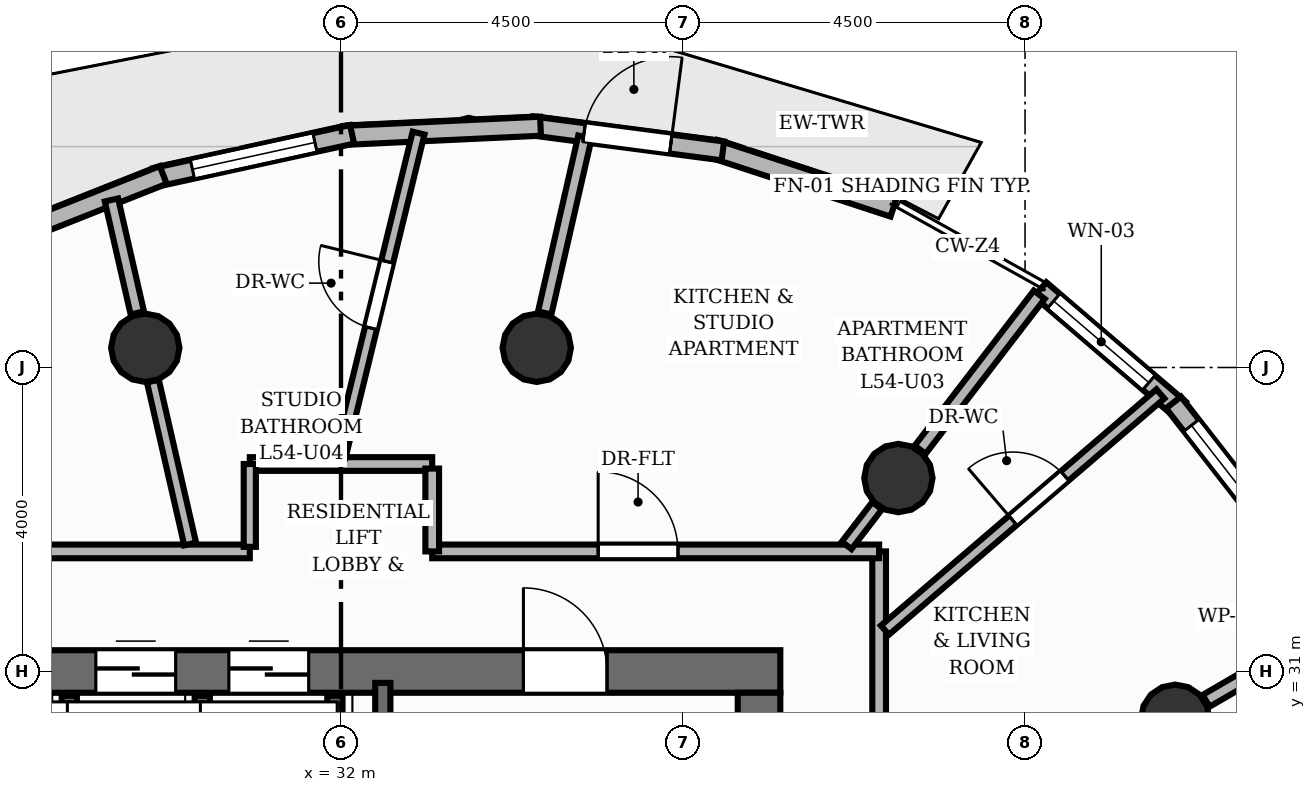
"""IFC4 building model, lengths in metres.
Left out: names, types, materials, properties, quantities, classifications, styles, units other than length and angle.
Written with IfcOpenShell. Run it as: python <this file> out.ifc"""

import sys

from ifc_helpers import new_model, si_unit, direction, frame, frame_2d, origin, origin_2d, place, context, subcontext, project, spatial, rectangle, circle, extrude, element, fill, save


model = new_model("IFC4")
c1 = context("Model", 3, precision=1e-05, world=origin(), true_north=direction((0.0, 1.0)))
c2 = subcontext(c1, "Body", "Model", "MODEL_VIEW")
j1 = project(units=[si_unit("LENGTHUNIT", "METRE"), si_unit("PLANEANGLEUNIT", "RADIAN")], contexts=[c1])
p1 = place(None, origin())
s1 = spatial("IfcSite", under=j1, at=p1, CompositionType="ELEMENT")
p2 = place(p1, origin())
s2 = spatial("IfcBuilding", under=s1, at=p2, CompositionType="ELEMENT")
p3 = place(p2, frame((0.0, 0.0, 182.24)))
s3 = spatial("IfcBuildingStorey", under=s2, at=p3, CompositionType="ELEMENT", Elevation=182.24)
p4 = place(p3, frame((26.22, 31.0, 0.0), z_axis=(0.0, 0.0, 1.0), x_axis=(1.0, 0.0, 0.0)))
e1 = element("IfcWall", 1, at=p4, inside=s3, PredefinedType="SHEAR", context=c2, shape_type="SweptSolid", body=[
    extrude(rectangle(XDim=11.56, YDim=0.56, at=frame_2d((5.78, 0.0))), origin(), (0.0, 0.0, 1.0), 3.2),
])
p5 = place(p4, frame((8.18, 0.0, 0.0)))
e2 = element("IfcOpeningElement", 2, at=p5, cuts=e1, PredefinedType="OPENING", context=c2, shape_type="SweptSolid", body=[
    extrude(rectangle(XDim=1.1, YDim=2.15, at=frame_2d((0.55, 1.075))), frame((0.0, 0.29, 0.0), z_axis=(0.0, -1.0, 0.0), x_axis=(1.0, 0.0, 0.0)), (0.0, 0.0, 1.0), 0.58),
])
p6 = place(p4, frame((0.805, 0.0, 0.0)))
e3 = element("IfcOpeningElement", 3, at=p6, cuts=e1, PredefinedType="OPENING", context=c2, shape_type="SweptSolid", body=[
    extrude(rectangle(XDim=1.05, YDim=2.15, at=frame_2d((0.525, 1.075))), frame((0.0, 0.29, 0.0), z_axis=(0.0, -1.0, 0.0), x_axis=(1.0, 0.0, 0.0)), (0.0, 0.0, 1.0), 0.58),
])
p7 = place(p4, frame((2.555, 0.0, 0.0)))
e4 = element("IfcOpeningElement", 4, at=p7, cuts=e1, PredefinedType="OPENING", context=c2, shape_type="SweptSolid", body=[
    extrude(rectangle(XDim=1.05, YDim=2.15, at=frame_2d((0.525, 1.075))), frame((0.0, 0.29, 0.0), z_axis=(0.0, -1.0, 0.0), x_axis=(1.0, 0.0, 0.0)), (0.0, 0.0, 1.0), 0.58),
])
p8 = place(p4, frame((4.305, 0.0, 0.0)))
e5 = element("IfcOpeningElement", 5, at=p8, cuts=e1, PredefinedType="OPENING", context=c2, shape_type="SweptSolid", body=[
    extrude(rectangle(XDim=1.05, YDim=2.15, at=frame_2d((0.525, 1.075))), frame((0.0, 0.29, 0.0), z_axis=(0.0, -1.0, 0.0), x_axis=(1.0, 0.0, 0.0)), (0.0, 0.0, 1.0), 0.58),
])
p9 = place(p3, frame((37.5, 17.28, 0.0), z_axis=(0.0, 0.0, 1.0), x_axis=(0.0, 1.0, 0.0)))
e6 = element("IfcWall", 6, at=p9, inside=s3, PredefinedType="SHEAR", context=c2, shape_type="SweptSolid", body=[
    extrude(rectangle(XDim=13.44, YDim=0.56, at=frame_2d((6.72, 0.0))), origin(), (0.0, 0.0, 1.0), 3.2),
])
for number, where, z_axis, x_axis in (
    (7, (42.975, 30.378, 0.0), (0.0, 0.0, 1.0), (1.0, 0.0, 0.0)),
    (8, (39.333, 33.545, 0.0), (0.0, 0.0, 1.0), (1.0, 0.0, 0.0)),
    (9, (34.575, 35.26, 0.0), (0.0, 0.0, 1.0), (1.0, 0.0, 0.0)),
    (10, (29.425, 35.26, 0.0), (0.0, 0.0, 1.0), (1.0, 0.0, 0.0)),
):
    element("IfcColumn", number, at=place(p3, frame(where, z_axis=z_axis, x_axis=x_axis)), inside=s3, PredefinedType="COLUMN", context=c2, shape_type="SweptSolid", body=[
        extrude(circle(Radius=0.45, at=origin_2d()), origin(), (0.0, 0.0, 1.0), 3.2),
    ])
p10 = place(p3, frame((41.198, 36.027, 0.0), z_axis=(0.0, 0.0, 1.0), x_axis=(0.759591927835, -0.65039995631, 0.0)))
e11 = element("IfcWall", 11, at=p10, inside=s3, PredefinedType="SOLIDWALL", context=c2, shape_type="SweptSolid", body=[
    extrude(rectangle(XDim=2.415, YDim=0.25, at=frame_2d((1.208, 0.0))), origin(), (0.0, 0.0, 1.0), 2.96),
])
p11 = place(p10, frame((0.234, 0.0, 0.85)))
e12 = element("IfcOpeningElement", 12, at=p11, cuts=e11, PredefinedType="OPENING", context=c2, shape_type="SweptSolid", body=[
    extrude(rectangle(XDim=1.65, YDim=1.52, at=frame_2d((0.825, 0.76))), frame((0.0, 0.135, 0.0), z_axis=(0.0, -1.0, 0.0), x_axis=(1.0, 0.0, 0.0)), (0.0, 0.0, 1.0), 0.27),
])
p12 = place(p3, frame((36.914, 37.875, 0.0), z_axis=(0.0, 0.0, 1.0), x_axis=(0.950422545433, -0.310961388491, 0.0)))
e13 = element("IfcWall", 13, at=p12, inside=s3, PredefinedType="SOLIDWALL", context=c2, shape_type="SweptSolid", body=[
    extrude(rectangle(XDim=2.478, YDim=0.25, at=frame_2d((1.239, 0.0))), origin(), (0.0, 0.0, 1.0), 2.96),
])
p13 = place(p3, frame((34.513, 38.179, 0.0), z_axis=(0.0, 0.0, 1.0), x_axis=(0.991491995227, -0.130167674176, 0.0)))
e14 = element("IfcWall", 14, at=p13, inside=s3, PredefinedType="SOLIDWALL", context=c2, shape_type="SweptSolid", body=[
    extrude(rectangle(XDim=2.532, YDim=0.25, at=frame_2d((1.266, 0.0))), origin(), (0.0, 0.0, 1.0), 2.96),
])
p14 = place(p13, frame((0.691, 0.0, 0.0)))
e15 = element("IfcOpeningElement", 15, at=p14, cuts=e14, PredefinedType="OPENING", context=c2, shape_type="SweptSolid", body=[
    extrude(rectangle(XDim=1.15, YDim=2.2, at=frame_2d((0.575, 1.1))), frame((0.0, 0.135, 0.0), z_axis=(0.0, -1.0, 0.0), x_axis=(1.0, 0.0, 0.0)), (0.0, 0.0, 1.0), 0.27),
])
p15 = place(p3, frame((32.036, 38.053, 0.0), z_axis=(0.0, 0.0, 1.0), x_axis=(0.998912652492, 0.046620946915, 0.0)))
e16 = element("IfcWall", 16, at=p15, inside=s3, PredefinedType="SOLIDWALL", context=c2, shape_type="SweptSolid", body=[
    extrude(rectangle(XDim=2.592, YDim=0.25, at=frame_2d((1.296, 0.0))), origin(), (0.0, 0.0, 1.0), 2.96),
])
p16 = place(p3, frame((29.556, 37.501, 0.0), z_axis=(0.0, 0.0, 1.0), x_axis=(0.976886196324, 0.213760051067, 0.0)))
e17 = element("IfcWall", 17, at=p16, inside=s3, PredefinedType="SOLIDWALL", context=c2, shape_type="SweptSolid", body=[
    extrude(rectangle(XDim=2.651, YDim=0.25, at=frame_2d((1.325, 0.0))), origin(), (0.0, 0.0, 1.0), 2.96),
])
p17 = place(p16, frame((0.501, 0.0, 0.85)))
e18 = element("IfcOpeningElement", 18, at=p17, cuts=e17, PredefinedType="OPENING", context=c2, shape_type="SweptSolid", body=[
    extrude(rectangle(XDim=1.65, YDim=1.55, at=frame_2d((0.825, 0.775))), frame((0.0, 0.135, 0.0), z_axis=(0.0, -1.0, 0.0), x_axis=(1.0, 0.0, 0.0)), (0.0, 0.0, 1.0), 0.27),
])
p18 = place(p3, frame((27.149, 36.538, 0.0), z_axis=(0.0, 0.0, 1.0), x_axis=(0.929693178164, 0.368334894459, 0.0)))
e19 = element("IfcWall", 19, at=p18, inside=s3, PredefinedType="SOLIDWALL", context=c2, shape_type="SweptSolid", body=[
    extrude(rectangle(XDim=2.702, YDim=0.25, at=frame_2d((1.351, 0.0))), origin(), (0.0, 0.0, 1.0), 2.96),
])
p19 = place(p3, frame((42.953, 34.539, 0.0), z_axis=(0.0, 0.0, 1.0), x_axis=(0.61468225386, -0.788774826417, 0.0)))
e20 = element("IfcWall", 20, at=p19, inside=s3, PredefinedType="SOLIDWALL", context=c2, shape_type="SweptSolid", body=[
    extrude(rectangle(XDim=2.415, YDim=0.25, at=frame_2d((1.208, 0.0))), origin(), (0.0, 0.0, 1.0), 2.96),
])
p20 = place(p19, frame((0.382, 0.0, 0.85)))
e21 = element("IfcOpeningElement", 21, at=p20, cuts=e20, PredefinedType="OPENING", context=c2, shape_type="SweptSolid", body=[
    extrude(rectangle(XDim=1.65, YDim=1.55, at=frame_2d((0.825, 0.775))), frame((0.0, 0.135, 0.0), z_axis=(0.0, -1.0, 0.0), x_axis=(1.0, 0.0, 0.0)), (0.0, 0.0, 1.0), 0.27),
])
p21 = place(p3, frame((32.55, 27.35, 0.0), z_axis=(0.0, 0.0, 1.0), x_axis=(0.0, 1.0, 0.0)))
e22 = element("IfcWall", 22, at=p21, inside=s3, PredefinedType="SHEAR", context=c2, shape_type="SweptSolid", body=[
    extrude(rectangle(XDim=3.5, YDim=0.2, at=frame_2d((1.75, 0.0))), origin(), (0.0, 0.0, 1.0), 3.2),
])
for number, where, z_axis, x_axis in (
    (23, (31.92, 29.02, 0.0), (0.0, 0.0, 1.0), (0.0, 1.0, 0.0)),
    (24, (28.425, 29.02, 0.0), (0.0, 0.0, 1.0), (0.0, 1.0, 0.0)),
    (25, (30.175, 29.02, 0.0), (0.0, 0.0, 1.0), (0.0, 1.0, 0.0)),
):
    element("IfcWall", number, at=place(p3, frame(where, z_axis=z_axis, x_axis=x_axis)), inside=s3, PredefinedType="SHEAR", context=c2, shape_type="SweptSolid", body=[
        extrude(rectangle(XDim=1.66, YDim=0.2, at=frame_2d((0.83, 0.0))), origin(), (0.0, 0.0, 1.0), 3.2),
    ])
p22 = place(p3, frame((43.382, 30.614, 0.0), z_axis=(0.0, 0.0, 1.0), x_axis=(0.86456661279, 0.502518230563, 0.0)))
e26 = element("IfcWall", 26, at=p22, inside=s3, PredefinedType="PARTITIONING", context=c2, shape_type="SweptSolid", body=[
    extrude(rectangle(XDim=1.785, YDim=0.18, at=frame_2d((0.893, 0.0))), origin(), (0.0, 0.0, 1.0), 2.403),
])
p23 = place(p3, frame((39.62, 33.918, 0.0), z_axis=(0.0, 0.0, 1.0), x_axis=(0.609164681512, 0.793043750873, 0.0)))
e27 = element("IfcWall", 27, at=p23, inside=s3, PredefinedType="PARTITIONING", context=c2, shape_type="SweptSolid", body=[
    extrude(rectangle(XDim=2.572, YDim=0.18, at=frame_2d((1.286, 0.0))), origin(), (0.0, 0.0, 1.0), 2.403),
])
p24 = place(p3, frame((34.68, 35.718, 0.0), z_axis=(0.0, 0.0, 1.0), x_axis=(0.223011847659, 0.974815734282, 0.0)))
e28 = element("IfcWall", 28, at=p24, inside=s3, PredefinedType="PARTITIONING", context=c2, shape_type="SweptSolid", body=[
    extrude(rectangle(XDim=2.375, YDim=0.18, at=frame_2d((1.187, 0.0))), origin(), (0.0, 0.0, 1.0), 2.403),
])
p25 = place(p3, frame((29.32, 35.718, 0.0), z_axis=(0.0, 0.0, 1.0), x_axis=(-0.222976920769, 0.974823723965, 0.0)))
e29 = element("IfcWall", 29, at=p25, inside=s3, PredefinedType="PARTITIONING", context=c2, shape_type="SweptSolid", body=[
    extrude(rectangle(XDim=1.525, YDim=0.18, at=frame_2d((0.763, 0.0))), origin(), (0.0, 0.0, 1.0), 2.403),
])
p26 = place(p3, frame((39.08, 32.58, 0.0), z_axis=(0.0, 0.0, 1.0), x_axis=(0.0, -1.0, 0.0)))
e30 = element("IfcWall", 30, at=p26, inside=s3, PredefinedType="PARTITIONING", context=c2, shape_type="SweptSolid", body=[
    extrude(rectangle(XDim=4.468, YDim=0.18, at=frame_2d((2.234, 0.0))), origin(), (0.0, 0.0, 1.0), 2.955),
])
p27 = place(p26, frame((2.246, 0.0, 0.0)))
e31 = element("IfcOpeningElement", 31, at=p27, cuts=e30, PredefinedType="OPENING", context=c2, shape_type="SweptSolid", body=[
    extrude(rectangle(XDim=1.05, YDim=2.15, at=frame_2d((0.525, 1.075))), frame((0.0, 0.1, 0.0), z_axis=(0.0, -1.0, 0.0), x_axis=(1.0, 0.0, 0.0)), (0.0, 0.0, 1.0), 0.2),
])
p28 = place(p3, frame((33.2, 32.58, 0.0), z_axis=(0.0, 0.0, 1.0), x_axis=(1.0, 0.0, 0.0)))
e32 = element("IfcWall", 32, at=p28, inside=s3, PredefinedType="PARTITIONING", context=c2, shape_type="SweptSolid", body=[
    extrude(rectangle(XDim=5.88, YDim=0.18, at=frame_2d((2.94, 0.0))), origin(), (0.0, 0.0, 1.0), 2.955),
])
p29 = place(p28, frame((2.184, 0.0, 0.0)))
e33 = element("IfcOpeningElement", 33, at=p29, cuts=e32, PredefinedType="OPENING", context=c2, shape_type="SweptSolid", body=[
    extrude(rectangle(XDim=1.05, YDim=2.15, at=frame_2d((0.525, 1.075))), frame((0.0, 0.1, 0.0), z_axis=(0.0, -1.0, 0.0), x_axis=(1.0, 0.0, 0.0)), (0.0, 0.0, 1.0), 0.2),
])
p30 = place(p3, frame((30.8, 33.73, 0.0), z_axis=(0.0, 0.0, 1.0), x_axis=(1.0, 0.0, 0.0)))
e34 = element("IfcWall", 34, at=p30, inside=s3, PredefinedType="PARTITIONING", context=c2, shape_type="SweptSolid", body=[
    extrude(rectangle(XDim=2.4, YDim=0.18, at=frame_2d((1.2, 0.0))), origin(), (0.0, 0.0, 1.0), 2.955),
])
p31 = place(p3, frame((33.2, 33.67, 0.0), z_axis=(0.0, 0.0, 1.0), x_axis=(0.0, -1.0, 0.0)))
e35 = element("IfcWall", 35, at=p31, inside=s3, PredefinedType="PARTITIONING", context=c2, shape_type="SweptSolid", body=[
    extrude(rectangle(XDim=1.09, YDim=0.18, at=frame_2d((0.545, 0.0))), origin(), (0.0, 0.0, 1.0), 2.955),
])
p32 = place(p3, frame((24.92, 32.58, 0.0), z_axis=(0.0, 0.0, 1.0), x_axis=(1.0, 0.0, 0.0)))
e36 = element("IfcWall", 36, at=p32, inside=s3, PredefinedType="PARTITIONING", context=c2, shape_type="SweptSolid", body=[
    extrude(rectangle(XDim=5.88, YDim=0.18, at=frame_2d((2.94, 0.0))), origin(), (0.0, 0.0, 1.0), 2.955),
])
p33 = place(p3, frame((30.8, 32.64, 0.0), z_axis=(0.0, 0.0, 1.0), x_axis=(0.0, 1.0, 0.0)))
e37 = element("IfcWall", 37, at=p33, inside=s3, PredefinedType="PLUMBINGWALL", context=c2, shape_type="SweptSolid", body=[
    extrude(rectangle(XDim=1.09, YDim=0.16, at=frame_2d((0.545, 0.0))), origin(), (0.0, 0.0, 1.0), 2.955),
])
p34 = place(p3, frame((39.156, 31.544, 0.0), z_axis=(0.0, 0.0, 1.0), x_axis=(0.759083333315, 0.650993466238, 0.0)))
e38 = element("IfcWall", 38, at=p34, inside=s3, PredefinedType="PLUMBINGWALL", context=c2, shape_type="SweptSolid", body=[
    extrude(rectangle(XDim=4.775, YDim=0.16, at=frame_2d((2.387, 0.0))), origin(), (0.0, 0.0, 1.0), 2.955),
])
p35 = place(p34, frame((2.217, 0.0, 0.0)))
e39 = element("IfcOpeningElement", 39, at=p35, cuts=e38, PredefinedType="OPENING", context=c2, shape_type="SweptSolid", body=[
    extrude(rectangle(XDim=0.9, YDim=2.1, at=frame_2d((0.45, 1.05))), frame((0.0, 0.09, 0.0), z_axis=(0.0, -1.0, 0.0), x_axis=(1.0, 0.0, 0.0)), (0.0, 0.0, 1.0), 0.18),
])
p36 = place(p3, frame((38.653, 32.659, 0.0), z_axis=(0.0, 0.0, 1.0), x_axis=(0.609101063055, 0.79309261438, 0.0)))
e40 = element("IfcWall", 40, at=p36, inside=s3, PredefinedType="PLUMBINGWALL", context=c2, shape_type="SweptSolid", body=[
    extrude(rectangle(XDim=0.658, YDim=0.16, at=frame_2d((0.329, 0.0))), origin(), (0.0, 0.0, 1.0), 2.403),
])
p37 = place(p3, frame((31.981, 33.827, 0.0), z_axis=(0.0, 0.0, 1.0), x_axis=(0.237157525666, 0.971471208024, 0.0)))
e41 = element("IfcWall", 41, at=p37, inside=s3, PredefinedType="PLUMBINGWALL", context=c2, shape_type="SweptSolid", body=[
    extrude(rectangle(XDim=4.382, YDim=0.16, at=frame_2d((2.191, 0.0))), origin(), (0.0, 0.0, 1.0), 2.955),
])
p38 = place(p37, frame((1.741, 0.0, 0.0)))
e42 = element("IfcOpeningElement", 42, at=p38, cuts=e41, PredefinedType="OPENING", context=c2, shape_type="SweptSolid", body=[
    extrude(rectangle(XDim=0.9, YDim=2.1, at=frame_2d((0.45, 1.05))), frame((0.0, 0.09, 0.0), z_axis=(0.0, -1.0, 0.0), x_axis=(1.0, 0.0, 0.0)), (0.0, 0.0, 1.0), 0.18),
])
p39 = place(p3, frame((30.015, 32.677, 0.0), z_axis=(0.0, 0.0, 1.0), x_axis=(-0.222969522248, 0.974825416241, 0.0)))
e43 = element("IfcWall", 43, at=p39, inside=s3, PredefinedType="PLUMBINGWALL", context=c2, shape_type="SweptSolid", body=[
    extrude(rectangle(XDim=2.199, YDim=0.16, at=frame_2d((1.099, 0.0))), origin(), (0.0, 0.0, 1.0), 2.403),
])
p40 = place(p14, origin())
e44 = element("IfcDoor", 44, at=p40, inside=s3, OperationType="SINGLE_SWING_RIGHT", PredefinedType="DOOR", context=c2, shape_type="SweptSolid", body=[
    extrude(rectangle(XDim=1.15, YDim=2.2, at=frame_2d((0.575, 1.1))), frame((0.0, 0.025, 0.0), z_axis=(0.0, -1.0, 0.0), x_axis=(1.0, 0.0, 0.0)), (0.0, 0.0, 1.0), 0.05),
])
fill(e15, e44)
p41 = place(p11, origin())
e45 = element("IfcWindow", 45, at=p41, inside=s3, PartitioningType="SINGLE_PANEL", PredefinedType="WINDOW", context=c2, shape_type="SweptSolid", body=[
    extrude(rectangle(XDim=1.65, YDim=1.52, at=frame_2d((0.825, 0.76))), frame((0.0, 0.03, 0.0), z_axis=(0.0, -1.0, 0.0), x_axis=(1.0, 0.0, 0.0)), (0.0, 0.0, 1.0), 0.06),
])
fill(e12, e45)
p42 = place(p17, origin())
e46 = element("IfcWindow", 46, at=p42, inside=s3, PartitioningType="SINGLE_PANEL", PredefinedType="WINDOW", context=c2, shape_type="SweptSolid", body=[
    extrude(rectangle(XDim=1.65, YDim=1.55, at=frame_2d((0.825, 0.775))), frame((0.0, 0.03, 0.0), z_axis=(0.0, -1.0, 0.0), x_axis=(1.0, 0.0, 0.0)), (0.0, 0.0, 1.0), 0.06),
])
fill(e18, e46)
p43 = place(p20, origin())
e47 = element("IfcWindow", 47, at=p43, inside=s3, PartitioningType="SINGLE_PANEL", PredefinedType="WINDOW", context=c2, shape_type="SweptSolid", body=[
    extrude(rectangle(XDim=1.65, YDim=1.55, at=frame_2d((0.825, 0.775))), frame((0.0, 0.03, 0.0), z_axis=(0.0, -1.0, 0.0), x_axis=(1.0, 0.0, 0.0)), (0.0, 0.0, 1.0), 0.06),
])
fill(e21, e47)
p44 = place(p5, origin())
e48 = element("IfcDoor", 48, at=p44, inside=s3, OperationType="SINGLE_SWING_LEFT", PredefinedType="DOOR", context=c2, shape_type="SweptSolid", body=[
    extrude(rectangle(XDim=1.1, YDim=2.15, at=frame_2d((0.55, 1.075))), frame((0.0, 0.025, 0.0), z_axis=(0.0, -1.0, 0.0), x_axis=(1.0, 0.0, 0.0)), (0.0, 0.0, 1.0), 0.05),
])
fill(e2, e48)
p45 = place(p7, origin())
e49 = element("IfcDoor", 49, at=p45, inside=s3, OperationType="DOUBLE_DOOR_SLIDING", PredefinedType="DOOR", context=c2, shape_type="SweptSolid", body=[
    extrude(rectangle(XDim=1.05, YDim=2.15, at=frame_2d((0.525, 1.075))), frame((0.0, 0.025, 0.0), z_axis=(0.0, -1.0, 0.0), x_axis=(1.0, 0.0, 0.0)), (0.0, 0.0, 1.0), 0.05),
])
fill(e4, e49)
p46 = place(p8, origin())
e50 = element("IfcDoor", 50, at=p46, inside=s3, OperationType="DOUBLE_DOOR_SLIDING", PredefinedType="DOOR", context=c2, shape_type="SweptSolid", body=[
    extrude(rectangle(XDim=1.05, YDim=2.15, at=frame_2d((0.525, 1.075))), frame((0.0, 0.025, 0.0), z_axis=(0.0, -1.0, 0.0), x_axis=(1.0, 0.0, 0.0)), (0.0, 0.0, 1.0), 0.05),
])
fill(e5, e50)
p47 = place(p35, origin())
e51 = element("IfcDoor", 51, at=p47, inside=s3, OperationType="SINGLE_SWING_LEFT", PredefinedType="DOOR", context=c2, shape_type="SweptSolid", body=[
    extrude(rectangle(XDim=0.9, YDim=2.1, at=frame_2d((0.45, 1.05))), frame((0.0, 0.025, 0.0), z_axis=(0.0, -1.0, 0.0), x_axis=(1.0, 0.0, 0.0)), (0.0, 0.0, 1.0), 0.05),
])
fill(e39, e51)
p48 = place(p29, origin())
e52 = element("IfcDoor", 52, at=p48, inside=s3, OperationType="SINGLE_SWING_LEFT", PredefinedType="DOOR", context=c2, shape_type="SweptSolid", body=[
    extrude(rectangle(XDim=1.05, YDim=2.15, at=frame_2d((0.525, 1.075))), frame((0.0, 0.025, 0.0), z_axis=(0.0, -1.0, 0.0), x_axis=(1.0, 0.0, 0.0)), (0.0, 0.0, 1.0), 0.05),
])
fill(e33, e52)
p49 = place(p38, origin())
e53 = element("IfcDoor", 53, at=p49, inside=s3, OperationType="SINGLE_SWING_RIGHT", PredefinedType="DOOR", context=c2, shape_type="SweptSolid", body=[
    extrude(rectangle(XDim=0.9, YDim=2.1, at=frame_2d((0.45, 1.05))), frame((0.0, 0.025, 0.0), z_axis=(0.0, -1.0, 0.0), x_axis=(1.0, 0.0, 0.0)), (0.0, 0.0, 1.0), 0.05),
])
fill(e42, e53)
save(model, sys.argv[1])
